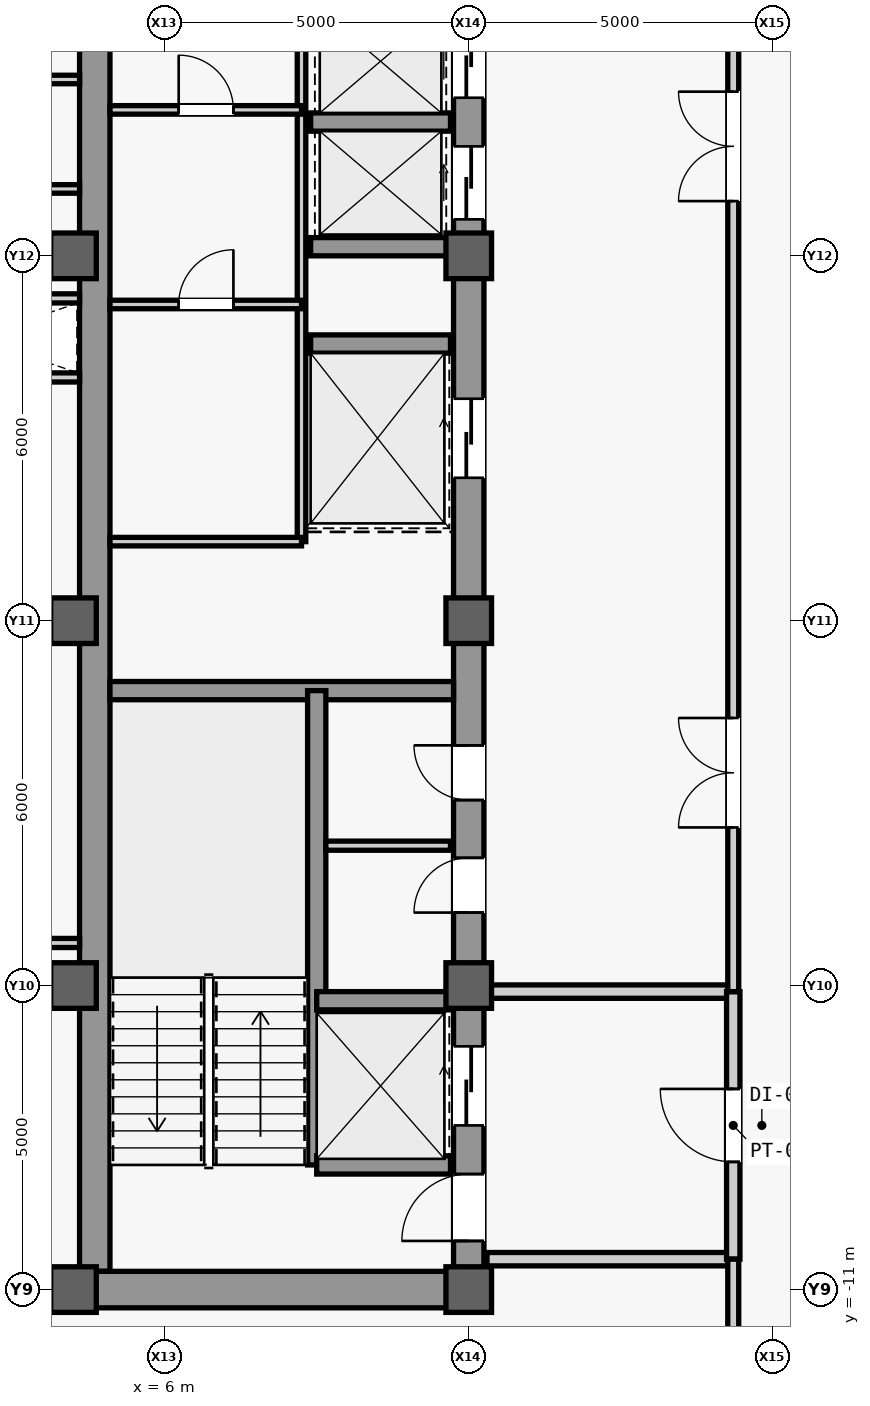
"""IFC4 building model, lengths in metres.
Left out: names, types, materials, properties, quantities, classifications, styles, units other than length and angle.
Written with IfcOpenShell. Run it as: python <this file> out.ifc"""

import sys

from ifc_helpers import new_model, si_unit, direction, frame, frame_2d, origin, origin_2d, place, context, subcontext, project, spatial, rectangle, extrude, source, transform, mapped, element, fill, save


model = new_model("IFC4")
c1 = context("Model", 3, precision=1e-05, world=origin(), true_north=direction((0.0, 1.0)))
c2 = subcontext(c1, "Body", "Model", "MODEL_VIEW")
j1 = project(units=[si_unit("LENGTHUNIT", "METRE"), si_unit("PLANEANGLEUNIT", "RADIAN")], contexts=[c1])
p1 = place(None, origin())
s1 = spatial("IfcSite", under=j1, at=p1, CompositionType="ELEMENT")
p2 = place(p1, origin())
s2 = spatial("IfcBuilding", under=s1, at=p2, CompositionType="ELEMENT")
p3 = place(p2, frame((0.0, 0.0, 301.5)))
s3 = spatial("IfcBuildingStorey", under=s2, at=p3, CompositionType="ELEMENT", Elevation=301.5)
m1 = source(origin(), c2, "Body", "SweptSolid", [
    extrude(rectangle(XDim=22.0, YDim=0.5, at=frame_2d((11.0, 0.0))), origin(), (0.0, 0.0, 1.0), 3.78),
])
p4 = place(p3, frame((11.0, -11.0, 0.0), z_axis=(0.0, 0.0, 1.0), x_axis=(0.0, 1.0, 0.0)))
e1 = element("IfcWall", 1, at=p4, inside=s3, PredefinedType="SHEAR", context=c2, shape_type="MappedRepresentation", body=[
    mapped(m1, transform((0.0, 0.0, 0.0), scale=1.0)),
])
m2 = source(origin(), c2, "Body", "SweptSolid", [
    extrude(rectangle(XDim=1.1, YDim=2.2, at=frame_2d((0.55, 1.1))), frame((0.0, 0.26, 0.0), z_axis=(0.0, -1.0, 0.0), x_axis=(1.0, 0.0, 0.0)), (0.0, 0.0, 1.0), 0.52),
])
p5 = place(p4, frame((0.8, 0.0, 0.0)))
e2 = element("IfcOpeningElement", 2, at=p5, cuts=e1, PredefinedType="OPENING", context=c2, shape_type="MappedRepresentation", body=[
    mapped(m2, transform((0.0, 0.0, 0.0), scale=1.0)),
])
m3 = source(origin(), c2, "Body", "SweptSolid", [
    extrude(rectangle(XDim=0.9, YDim=2.15, at=frame_2d((0.45, 1.075))), frame((0.0, 0.26, 0.0), z_axis=(0.0, -1.0, 0.0), x_axis=(1.0, 0.0, 0.0)), (0.0, 0.0, 1.0), 0.52),
])
p6 = place(p4, frame((6.2, 0.0, 0.0)))
e3 = element("IfcOpeningElement", 3, at=p6, cuts=e1, PredefinedType="OPENING", context=c2, shape_type="MappedRepresentation", body=[
    mapped(m3, transform((0.0, 0.0, 0.0), scale=1.0)),
])
p7 = place(p4, frame((8.05, 0.0, 0.0)))
e4 = element("IfcOpeningElement", 4, at=p7, cuts=e1, PredefinedType="OPENING", context=c2, shape_type="MappedRepresentation", body=[
    mapped(m3, transform((0.0, 0.0, 0.0), scale=1.0)),
])
m4 = source(origin(), c2, "Body", "SweptSolid", [
    extrude(rectangle(XDim=1.2, YDim=2.3, at=frame_2d((0.6, 1.15))), frame((0.0, 0.26, 0.0), z_axis=(0.0, -1.0, 0.0), x_axis=(1.0, 0.0, 0.0)), (0.0, 0.0, 1.0), 0.52),
])
p8 = place(p4, frame((17.6, 0.0, 0.0)))
e5 = element("IfcOpeningElement", 5, at=p8, cuts=e1, PredefinedType="OPENING", context=c2, shape_type="MappedRepresentation", body=[
    mapped(m4, transform((0.0, 0.0, 0.0), scale=1.0)),
])
p9 = place(p4, frame((19.6, 0.0, 0.0)))
e6 = element("IfcOpeningElement", 6, at=p9, cuts=e1, PredefinedType="OPENING", context=c2, shape_type="MappedRepresentation", body=[
    mapped(m4, transform((0.0, 0.0, 0.0), scale=1.0)),
])
m5 = source(origin(), c2, "Body", "SweptSolid", [
    extrude(rectangle(XDim=1.3, YDim=2.3, at=frame_2d((0.65, 1.15))), frame((0.0, 0.26, 0.0), z_axis=(0.0, -1.0, 0.0), x_axis=(1.0, 0.0, 0.0)), (0.0, 0.0, 1.0), 0.52),
])
p10 = place(p4, frame((2.7, 0.0, 0.0)))
e7 = element("IfcOpeningElement", 7, at=p10, cuts=e1, PredefinedType="OPENING", context=c2, shape_type="MappedRepresentation", body=[
    mapped(m5, transform((0.0, 0.0, 0.0), scale=1.0)),
])
p11 = place(p4, frame((13.35, 0.0, 0.0)))
e8 = element("IfcOpeningElement", 8, at=p11, cuts=e1, PredefinedType="OPENING", context=c2, shape_type="MappedRepresentation", body=[
    mapped(m5, transform((0.0, 0.0, 0.0), scale=1.0)),
])
m6 = source(origin(), c2, "Body", "SweptSolid", [
    extrude(rectangle(XDim=21.4, YDim=0.5, at=frame_2d((10.7, 0.0))), origin(), (0.0, 0.0, 1.0), 3.78),
])
p12 = place(p3, frame((4.85, -10.7, 0.0), z_axis=(0.0, 0.0, 1.0), x_axis=(0.0, 1.0, 0.0)))
e9 = element("IfcWall", 9, at=p12, inside=s3, PredefinedType="SHEAR", context=c2, shape_type="MappedRepresentation", body=[
    mapped(m6, transform((0.0, 0.0, 0.0), scale=1.0)),
])
m7 = source(origin(), c2, "Body", "SweptSolid", [
    extrude(rectangle(XDim=5.9, YDim=0.6, at=frame_2d((2.95, 0.0))), origin(), (0.0, 0.0, 1.0), 3.78),
])
p13 = place(p3, frame((4.85, -11.0, 0.0), z_axis=(0.0, 0.0, 1.0), x_axis=(1.0, 0.0, 0.0)))
e10 = element("IfcWall", 10, at=p13, inside=s3, PredefinedType="SHEAR", context=c2, shape_type="MappedRepresentation", body=[
    mapped(m7, transform((0.0, 0.0, 0.0), scale=1.0)),
])
m8 = source(origin(), c2, "Body", "SweptSolid", [
    extrude(rectangle(XDim=5.65, YDim=0.3, at=frame_2d((2.825, 0.0))), origin(), (0.0, 0.0, 1.0), 3.78),
])
p14 = place(p3, frame((5.1, -1.15, 0.0), z_axis=(0.0, 0.0, 1.0), x_axis=(1.0, 0.0, 0.0)))
e11 = element("IfcWall", 11, at=p14, inside=s3, PredefinedType="SHEAR", context=c2, shape_type="MappedRepresentation", body=[
    mapped(m8, transform((0.0, 0.0, 0.0), scale=1.0)),
])
m9 = source(origin(), c2, "Body", "SweptSolid", [
    extrude(rectangle(XDim=9.2, YDim=0.5, at=frame_2d((4.6, 0.0))), origin(), (0.0, 0.0, 1.0), 3.78),
])
p15 = place(p3, frame((-4.6, -11.0, 0.0), z_axis=(0.0, 0.0, 1.0), x_axis=(1.0, 0.0, 0.0)))
e12 = element("IfcWall", 12, at=p15, inside=s3, PredefinedType="SHEAR", context=c2, shape_type="MappedRepresentation", body=[
    mapped(m9, transform((0.0, 0.0, 0.0), scale=1.0)),
])
m10 = source(origin(), c2, "Body", "SweptSolid", [
    extrude(rectangle(XDim=1.8, YDim=2.25, at=frame_2d((0.9, 1.125))), frame((0.0, 0.26, 0.0), z_axis=(0.0, -1.0, 0.0), x_axis=(1.0, 0.0, 0.0)), (0.0, 0.0, 1.0), 0.52),
])
p16 = place(p15, frame((3.7, 0.0, 0.0)))
e13 = element("IfcOpeningElement", 13, at=p16, cuts=e12, PredefinedType="OPENING", context=c2, shape_type="MappedRepresentation", body=[
    mapped(m10, transform((0.0, 0.0, 0.0), scale=1.0)),
])
m11 = source(origin(), c2, "Body", "SweptSolid", [
    extrude(rectangle(XDim=0.75, YDim=0.75, at=origin_2d()), origin(), (0.0, 0.0, 1.0), 4.0),
])
for number, where, z_axis, x_axis in (
    (14, (4.5, -11.0, 0.0), (0.0, 0.0, 1.0), (1.0, 0.0, 0.0)),
    (15, (4.5, -6.0, 0.0), (0.0, 0.0, 1.0), (1.0, 0.0, 0.0)),
    (16, (4.5, 0.0, 0.0), (0.0, 0.0, 1.0), (1.0, 0.0, 0.0)),
    (17, (4.5, 6.0, 0.0), (0.0, 0.0, 1.0), (1.0, 0.0, 0.0)),
    (18, (11.0, -11.0, 0.0), (0.0, 0.0, 1.0), (1.0, 0.0, 0.0)),
    (19, (11.0, -6.0, 0.0), (0.0, 0.0, 1.0), (1.0, 0.0, 0.0)),
    (20, (11.0, 0.0, 0.0), (0.0, 0.0, 1.0), (1.0, 0.0, 0.0)),
    (21, (11.0, 6.0, 0.0), (0.0, 0.0, 1.0), (1.0, 0.0, 0.0)),
):
    element("IfcColumn", number, at=place(p3, frame(where, z_axis=z_axis, x_axis=x_axis)), inside=s3, PredefinedType="COLUMN", context=c2, shape_type="MappedRepresentation", body=[
        mapped(m11, transform((0.0, 0.0, 0.0), scale=1.0)),
    ])
m12 = source(origin(), c2, "Body", "SweptSolid", [
    extrude(rectangle(XDim=7.8, YDim=0.3, at=frame_2d((3.9, 0.0))), origin(), (0.0, 0.0, 1.0), 3.78),
])
p17 = place(p3, frame((8.5, -8.95, 0.0), z_axis=(0.0, 0.0, 1.0), x_axis=(0.0, 1.0, 0.0)))
e22 = element("IfcWall", 22, at=p17, inside=s3, PredefinedType="SHEAR", context=c2, shape_type="MappedRepresentation", body=[
    mapped(m12, transform((0.0, 0.0, 0.0), scale=1.0)),
])
m13 = source(origin(), c2, "Body", "SweptSolid", [
    extrude(rectangle(XDim=2.2, YDim=0.3, at=frame_2d((1.1, 0.0))), origin(), (0.0, 0.0, 1.0), 3.78),
])
for number, where, z_axis, x_axis in (
    (23, (8.5, -8.95, 0.0), (0.0, 0.0, 1.0), (1.0, 0.0, 0.0)),
    (24, (8.5, -6.25, 0.0), (0.0, 0.0, 1.0), (1.0, 0.0, 0.0)),
):
    element("IfcWall", number, at=place(p3, frame(where, z_axis=z_axis, x_axis=x_axis)), inside=s3, PredefinedType="SHEAR", context=c2, shape_type="MappedRepresentation", body=[
        mapped(m13, transform((0.0, 0.0, 0.0), scale=1.0)),
    ])
m14 = source(origin(), c2, "Body", "SweptSolid", [
    extrude(rectangle(XDim=2.3, YDim=0.3, at=frame_2d((1.15, 0.0))), origin(), (0.0, 0.0, 1.0), 3.78),
])
for number, where, z_axis, x_axis in (
    (25, (8.4, 4.55, 0.0), (0.0, 0.0, 1.0), (1.0, 0.0, 0.0)),
    (26, (8.4, 6.15, 0.0), (0.0, 0.0, 1.0), (1.0, 0.0, 0.0)),
    (27, (8.4, 8.2, 0.0), (0.0, 0.0, 1.0), (1.0, 0.0, 0.0)),
):
    element("IfcWall", number, at=place(p3, frame(where, z_axis=z_axis, x_axis=x_axis)), inside=s3, PredefinedType="SHEAR", context=c2, shape_type="MappedRepresentation", body=[
        mapped(m14, transform((0.0, 0.0, 0.0), scale=1.0)),
    ])
m15 = source(origin(), c2, "Body", "SweptSolid", [
    extrude(rectangle(XDim=2.05, YDim=0.15, at=frame_2d((1.025, 0.0))), origin(), (0.0, 0.0, 1.0), 3.78),
])
p18 = place(p3, frame((8.65, -3.7, 0.0), z_axis=(0.0, 0.0, 1.0), x_axis=(1.0, 0.0, 0.0)))
e28 = element("IfcWall", 28, at=p18, inside=s3, PredefinedType="PARTITIONING", context=c2, shape_type="MappedRepresentation", body=[
    mapped(m15, transform((0.0, 0.0, 0.0), scale=1.0)),
])
m16 = source(origin(), c2, "Body", "SweptSolid", [
    extrude(rectangle(XDim=9.4, YDim=0.14, at=frame_2d((4.7, 0.0))), origin(), (0.0, 0.0, 1.0), 3.78),
])
p19 = place(p3, frame((8.25, 1.3, 0.0), z_axis=(0.0, 0.0, 1.0), x_axis=(0.0, 1.0, 0.0)))
e29 = element("IfcWall", 29, at=p19, inside=s3, PredefinedType="PARTITIONING", context=c2, shape_type="MappedRepresentation", body=[
    mapped(m16, transform((0.0, 0.0, 0.0), scale=1.0)),
])
m17 = source(origin(), c2, "Body", "SweptSolid", [
    extrude(rectangle(XDim=3.15, YDim=0.14, at=frame_2d((1.575, 0.0))), origin(), (0.0, 0.0, 1.0), 3.78),
])
p20 = place(p3, frame((5.1, 1.3, 0.0), z_axis=(0.0, 0.0, 1.0), x_axis=(1.0, 0.0, 0.0)))
e30 = element("IfcWall", 30, at=p20, inside=s3, PredefinedType="PARTITIONING", context=c2, shape_type="MappedRepresentation", body=[
    mapped(m17, transform((0.0, 0.0, 0.0), scale=1.0)),
])
p21 = place(p3, frame((5.1, 8.4, 0.0), z_axis=(0.0, 0.0, 1.0), x_axis=(1.0, 0.0, 0.0)))
e31 = element("IfcWall", 31, at=p21, inside=s3, PredefinedType="PARTITIONING", context=c2, shape_type="MappedRepresentation", body=[
    mapped(m17, transform((0.0, 0.0, 0.0), scale=1.0)),
])
m18 = source(origin(), c2, "Body", "SweptSolid", [
    extrude(rectangle(XDim=0.9, YDim=2.15, at=frame_2d((0.45, 1.075))), frame((0.0, 0.08, 0.0), z_axis=(0.0, -1.0, 0.0), x_axis=(1.0, 0.0, 0.0)), (0.0, 0.0, 1.0), 0.16),
])
p22 = place(p21, frame((1.13, 0.0, 0.0)))
e32 = element("IfcOpeningElement", 32, at=p22, cuts=e31, PredefinedType="OPENING", context=c2, shape_type="MappedRepresentation", body=[
    mapped(m18, transform((0.0, 0.0, 0.0), scale=1.0)),
])
p23 = place(p3, frame((5.1, 5.2, 0.0), z_axis=(0.0, 0.0, 1.0), x_axis=(1.0, 0.0, 0.0)))
e33 = element("IfcWall", 33, at=p23, inside=s3, PredefinedType="PARTITIONING", context=c2, shape_type="MappedRepresentation", body=[
    mapped(m17, transform((0.0, 0.0, 0.0), scale=1.0)),
])
p24 = place(p23, frame((1.13, 0.0, 0.0)))
e34 = element("IfcOpeningElement", 34, at=p24, cuts=e33, PredefinedType="OPENING", context=c2, shape_type="MappedRepresentation", body=[
    mapped(m18, transform((0.0, 0.0, 0.0), scale=1.0)),
])
m19 = source(origin(), c2, "Body", "SweptSolid", [
    extrude(rectangle(XDim=4.05, YDim=0.22, at=frame_2d((2.025, 0.0))), origin(), (0.0, 0.0, 1.0), 3.78),
])
p25 = place(p3, frame((11.3, -10.5, 0.0), z_axis=(0.0, 0.0, 1.0), x_axis=(1.0, 0.0, 0.0)))
e35 = element("IfcWall", 35, at=p25, inside=s3, PredefinedType="PARTITIONING", context=c2, shape_type="MappedRepresentation", body=[
    mapped(m19, transform((0.0, 0.0, 0.0), scale=1.0)),
])
m20 = source(origin(), c2, "Body", "SweptSolid", [
    extrude(rectangle(XDim=4.05, YDim=0.22, at=frame_2d((2.025, 0.0))), origin(), (0.0, 0.0, 1.0), 3.085),
])
p26 = place(p3, frame((11.3, -6.1, 0.0), z_axis=(0.0, 0.0, 1.0), x_axis=(1.0, 0.0, 0.0)))
e36 = element("IfcWall", 36, at=p26, inside=s3, PredefinedType="PARTITIONING", context=c2, shape_type="MappedRepresentation", body=[
    mapped(m20, transform((0.0, 0.0, 0.0), scale=1.0)),
])
m21 = source(origin(), c2, "Body", "SweptSolid", [
    extrude(rectangle(XDim=4.4, YDim=0.22, at=frame_2d((2.2, 0.0))), origin(), (0.0, 0.0, 1.0), 3.78),
])
p27 = place(p3, frame((15.35, -10.5, 0.0), z_axis=(0.0, 0.0, 1.0), x_axis=(0.0, 1.0, 0.0)))
e37 = element("IfcWall", 37, at=p27, inside=s3, PredefinedType="PARTITIONING", context=c2, shape_type="MappedRepresentation", body=[
    mapped(m21, transform((0.0, 0.0, 0.0), scale=1.0)),
])
m22 = source(origin(), c2, "Body", "SweptSolid", [
    extrude(rectangle(XDim=1.2, YDim=2.2, at=frame_2d((0.6, 1.1))), frame((0.0, 0.12, 0.0), z_axis=(0.0, -1.0, 0.0), x_axis=(1.0, 0.0, 0.0)), (0.0, 0.0, 1.0), 0.24),
])
p28 = place(p27, frame((1.6, 0.0, 0.0)))
e38 = element("IfcOpeningElement", 38, at=p28, cuts=e37, PredefinedType="OPENING", context=c2, shape_type="MappedRepresentation", body=[
    mapped(m22, transform((0.0, 0.0, 0.0), scale=1.0)),
])
m23 = source(origin(), c2, "Body", "SweptSolid", [
    extrude(rectangle(XDim=16.6, YDim=0.18, at=frame_2d((8.3, 0.0))), origin(), (0.0, 0.0, 1.0), 3.78),
])
p29 = place(p3, frame((15.35, -6.1, 0.0), z_axis=(0.0, 0.0, 1.0), x_axis=(0.0, 1.0, 0.0)))
e39 = element("IfcWall", 39, at=p29, inside=s3, PredefinedType="PARTITIONING", context=c2, shape_type="MappedRepresentation", body=[
    mapped(m23, transform((0.0, 0.0, 0.0), scale=1.0)),
])
m24 = source(origin(), c2, "Body", "SweptSolid", [
    extrude(rectangle(XDim=1.8, YDim=2.25, at=frame_2d((0.9, 1.125))), frame((0.0, 0.1, 0.0), z_axis=(0.0, -1.0, 0.0), x_axis=(1.0, 0.0, 0.0)), (0.0, 0.0, 1.0), 0.2),
])
p30 = place(p29, frame((2.7, 0.0, 0.0)))
e40 = element("IfcOpeningElement", 40, at=p30, cuts=e39, PredefinedType="OPENING", context=c2, shape_type="MappedRepresentation", body=[
    mapped(m24, transform((0.0, 0.0, 0.0), scale=1.0)),
])
p31 = place(p29, frame((13.0, 0.0, 0.0)))
e41 = element("IfcOpeningElement", 41, at=p31, cuts=e39, PredefinedType="OPENING", context=c2, shape_type="MappedRepresentation", body=[
    mapped(m24, transform((0.0, 0.0, 0.0), scale=1.0)),
])
m25 = source(origin(), c2, "Body", "SweptSolid", [
    extrude(rectangle(XDim=3.45, YDim=0.15, at=frame_2d((1.725, 0.0))), origin(), (0.0, 0.0, 1.0), 3.78),
])
for number, where, z_axis, x_axis in (
    (42, (1.15, 4.0, 0.0), (0.0, 0.0, 1.0), (1.0, 0.0, 0.0)),
    (43, (1.15, -5.3, 0.0), (0.0, 0.0, 1.0), (1.0, 0.0, 0.0)),
):
    element("IfcWall", number, at=place(p3, frame(where, z_axis=z_axis, x_axis=x_axis)), inside=s3, PredefinedType="PARTITIONING", context=c2, shape_type="MappedRepresentation", body=[
        mapped(m25, transform((0.0, 0.0, 0.0), scale=1.0)),
    ])
m26 = source(origin(), c2, "Body", "SweptSolid", [
    extrude(rectangle(XDim=3.45, YDim=0.14, at=frame_2d((1.725, 0.0))), origin(), (0.0, 0.0, 1.0), 3.78),
])
for number, where, z_axis, x_axis in (
    (44, (1.15, 7.1, 0.0), (0.0, 0.0, 1.0), (1.0, 0.0, 0.0)),
    (45, (1.15, 8.9, 0.0), (0.0, 0.0, 1.0), (1.0, 0.0, 0.0)),
):
    element("IfcWall", number, at=place(p3, frame(where, z_axis=z_axis, x_axis=x_axis)), inside=s3, PredefinedType="PARTITIONING", context=c2, shape_type="MappedRepresentation", body=[
        mapped(m26, transform((0.0, 0.0, 0.0), scale=1.0)),
    ])
p32 = place(p3, frame((1.15, 5.3, 0.0), z_axis=(0.0, 0.0, 1.0), x_axis=(1.0, 0.0, 0.0)))
e46 = element("IfcWall", 46, at=p32, inside=s3, PredefinedType="PARTITIONING", context=c2, shape_type="MappedRepresentation", body=[
    mapped(m25, transform((0.0, 0.0, 0.0), scale=1.0)),
])
m27 = source(origin(), c2, "Body", "SweptSolid", [
    extrude(rectangle(XDim=4.4, YDim=0.18, at=frame_2d((2.2, 0.0))), origin(), (0.0, 0.0, 1.0), 3.78),
])
p33 = place(p3, frame((15.35, -14.9, 0.0), z_axis=(0.0, 0.0, 1.0), x_axis=(0.0, 1.0, 0.0)))
e47 = element("IfcWall", 47, at=p33, inside=s3, PredefinedType="PARTITIONING", context=c2, shape_type="MappedRepresentation", body=[
    mapped(m27, transform((0.0, 0.0, 0.0), scale=1.0)),
])
m28 = source(origin(), c2, "Body", "SweptSolid", [
    extrude(rectangle(XDim=1.1, YDim=2.2, at=frame_2d((0.55, 1.1))), frame((0.0, 0.025, 0.0), z_axis=(0.0, -1.0, 0.0), x_axis=(1.0, 0.0, 0.0)), (0.0, 0.0, 1.0), 0.05),
])
p34 = place(p5, origin())
e48 = element("IfcDoor", 48, at=p34, inside=s3, OperationType="SINGLE_SWING_LEFT", PredefinedType="DOOR", context=c2, shape_type="MappedRepresentation", body=[
    mapped(m28, transform((0.0, 0.0, 0.0), scale=1.0)),
])
fill(e2, e48)
m29 = source(origin(), c2, "Body", "SweptSolid", [
    extrude(rectangle(XDim=0.9, YDim=2.15, at=frame_2d((0.45, 1.075))), frame((0.0, 0.025, 0.0), z_axis=(0.0, -1.0, 0.0), x_axis=(1.0, 0.0, 0.0)), (0.0, 0.0, 1.0), 0.05),
])
p35 = place(p6, origin())
e49 = element("IfcDoor", 49, at=p35, inside=s3, OperationType="SINGLE_SWING_LEFT", PredefinedType="DOOR", context=c2, shape_type="MappedRepresentation", body=[
    mapped(m29, transform((0.0, 0.0, 0.0), scale=1.0)),
])
fill(e3, e49)
p36 = place(p7, origin())
e50 = element("IfcDoor", 50, at=p36, inside=s3, OperationType="SINGLE_SWING_RIGHT", PredefinedType="DOOR", context=c2, shape_type="MappedRepresentation", body=[
    mapped(m29, transform((0.0, 0.0, 0.0), scale=1.0)),
])
fill(e4, e50)
p37 = place(p22, origin())
e51 = element("IfcDoor", 51, at=p37, inside=s3, OperationType="SINGLE_SWING_LEFT", PredefinedType="DOOR", context=c2, shape_type="MappedRepresentation", body=[
    mapped(m29, transform((0.0, 0.0, 0.0), scale=1.0)),
])
fill(e32, e51)
p38 = place(p24, origin())
e52 = element("IfcDoor", 52, at=p38, inside=s3, OperationType="SINGLE_SWING_RIGHT", PredefinedType="DOOR", context=c2, shape_type="MappedRepresentation", body=[
    mapped(m29, transform((0.0, 0.0, 0.0), scale=1.0)),
])
fill(e34, e52)
m30 = source(origin(), c2, "Body", "SweptSolid", [
    extrude(rectangle(XDim=1.2, YDim=2.2, at=frame_2d((0.6, 1.1))), frame((0.0, 0.025, 0.0), z_axis=(0.0, -1.0, 0.0), x_axis=(1.0, 0.0, 0.0)), (0.0, 0.0, 1.0), 0.05),
])
p39 = place(p28, origin())
e53 = element("IfcDoor", 53, at=p39, inside=s3, OperationType="SINGLE_SWING_RIGHT", PredefinedType="DOOR", context=c2, shape_type="MappedRepresentation", body=[
    mapped(m30, transform((0.0, 0.0, 0.0), scale=1.0)),
])
fill(e38, e53)
m31 = source(origin(), c2, "Body", "SweptSolid", [
    extrude(rectangle(XDim=1.8, YDim=2.25, at=frame_2d((0.9, 1.125))), frame((0.0, 0.025, 0.0), z_axis=(0.0, -1.0, 0.0), x_axis=(1.0, 0.0, 0.0)), (0.0, 0.0, 1.0), 0.05),
])
p40 = place(p30, origin())
e54 = element("IfcDoor", 54, at=p40, inside=s3, OperationType="SINGLE_SWING_RIGHT", PredefinedType="DOOR", context=c2, shape_type="MappedRepresentation", body=[
    mapped(m31, transform((0.0, 0.0, 0.0), scale=1.0)),
])
fill(e40, e54)
p41 = place(p31, origin())
e55 = element("IfcDoor", 55, at=p41, inside=s3, OperationType="SINGLE_SWING_LEFT", PredefinedType="DOOR", context=c2, shape_type="MappedRepresentation", body=[
    mapped(m31, transform((0.0, 0.0, 0.0), scale=1.0)),
])
fill(e41, e55)
m32 = source(origin(), c2, "Body", "SweptSolid", [
    extrude(rectangle(XDim=1.2, YDim=2.3, at=frame_2d((0.6, 1.15))), frame((0.0, 0.025, 0.0), z_axis=(0.0, -1.0, 0.0), x_axis=(1.0, 0.0, 0.0)), (0.0, 0.0, 1.0), 0.05),
])
p42 = place(p8, origin())
e56 = element("IfcDoor", 56, at=p42, inside=s3, OperationType="SLIDING_TO_LEFT", PredefinedType="DOOR", context=c2, shape_type="MappedRepresentation", body=[
    mapped(m32, transform((0.0, 0.0, 0.0), scale=1.0)),
])
fill(e5, e56)
p43 = place(p9, origin())
e57 = element("IfcDoor", 57, at=p43, inside=s3, OperationType="SLIDING_TO_LEFT", PredefinedType="DOOR", context=c2, shape_type="MappedRepresentation", body=[
    mapped(m32, transform((0.0, 0.0, 0.0), scale=1.0)),
])
fill(e6, e57)
m33 = source(origin(), c2, "Body", "SweptSolid", [
    extrude(rectangle(XDim=1.3, YDim=2.3, at=frame_2d((0.65, 1.15))), frame((0.0, 0.025, 0.0), z_axis=(0.0, -1.0, 0.0), x_axis=(1.0, 0.0, 0.0)), (0.0, 0.0, 1.0), 0.05),
])
p44 = place(p10, origin())
e58 = element("IfcDoor", 58, at=p44, inside=s3, OperationType="SLIDING_TO_LEFT", PredefinedType="DOOR", context=c2, shape_type="MappedRepresentation", body=[
    mapped(m33, transform((0.0, 0.0, 0.0), scale=1.0)),
])
fill(e7, e58)
p45 = place(p11, origin())
e59 = element("IfcDoor", 59, at=p45, inside=s3, OperationType="SLIDING_TO_LEFT", PredefinedType="DOOR", context=c2, shape_type="MappedRepresentation", body=[
    mapped(m33, transform((0.0, 0.0, 0.0), scale=1.0)),
])
fill(e8, e59)
save(model, sys.argv[1])
